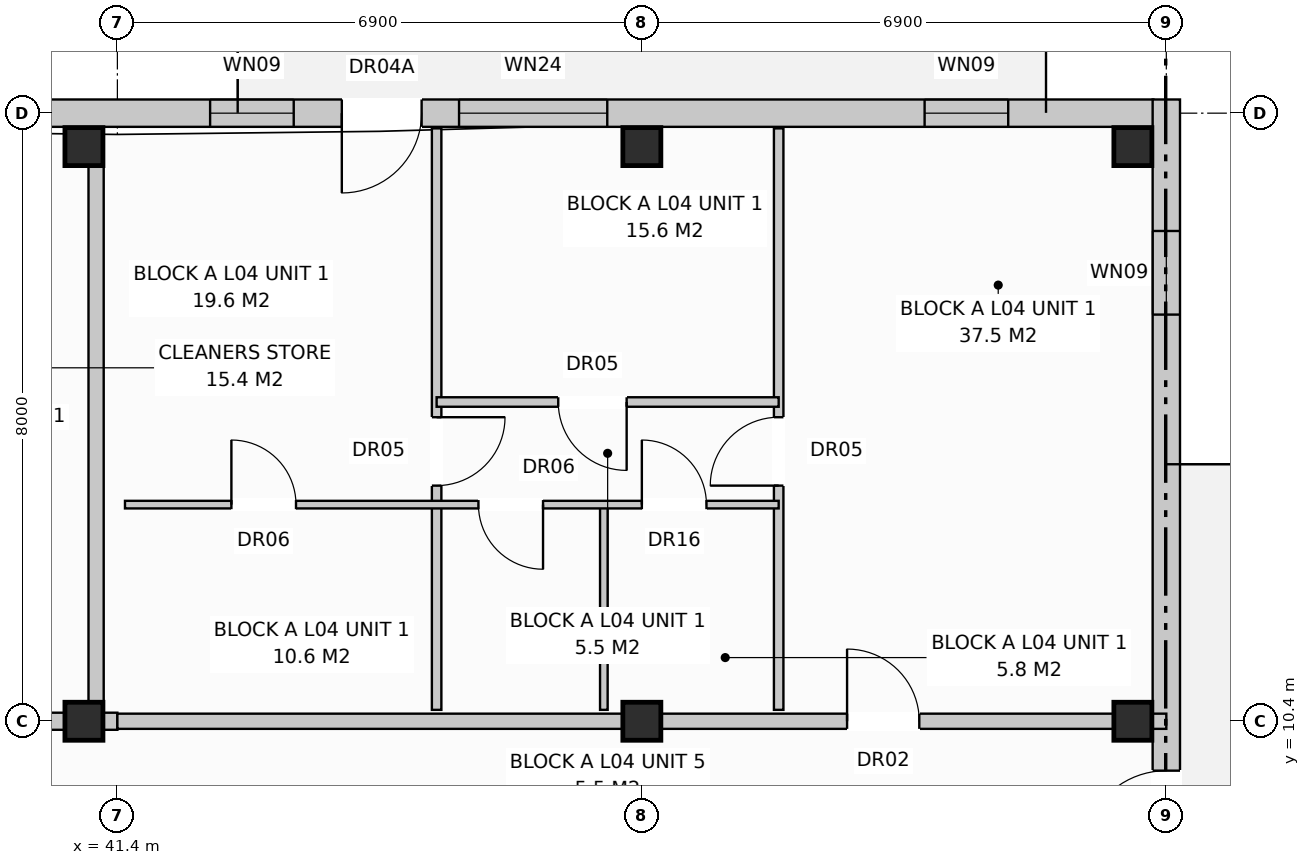
"""IFC4 building model, lengths in metres.
Left out: names, types, materials, properties, quantities, classifications, styles, units other than length and angle.
Written with IfcOpenShell. Run it as: python <this file> out.ifc"""

import sys

from ifc_helpers import new_model, si_unit, direction, frame, frame_2d, origin, origin_with_axes, origin_2d, place, context, subcontext, project, spatial, rectangle, extrude, element, fill, save


model = new_model("IFC4")
c1 = context("Model", 3, precision=1e-05, world=origin(), true_north=direction((0.0, 1.0)))
c2 = subcontext(c1, "Body", "Model", "MODEL_VIEW")
j1 = project(units=[si_unit("LENGTHUNIT", "METRE"), si_unit("PLANEANGLEUNIT", "RADIAN")], contexts=[c1])
p1 = place(None, origin())
s1 = spatial("IfcSite", under=j1, at=p1, CompositionType="ELEMENT")
p2 = place(p1, origin())
s2 = spatial("IfcBuilding", under=s1, at=p2, CompositionType="ELEMENT")
p3 = place(p2, frame((0.0, 0.0, 14.4)))
s3 = spatial("IfcBuildingStorey", under=s2, at=p3, CompositionType="ELEMENT", Elevation=14.4)
for number, where, z_axis, x_axis in (
    (1, (40.96, 10.4, 0.0), (0.0, 0.0, 1.0), (1.0, 0.0, 0.0)),
    (2, (40.96, 17.96, 0.0), (0.0, 0.0, 1.0), (1.0, 0.0, 0.0)),
    (3, (48.3, 10.4, 0.0), (0.0, 0.0, 1.0), (1.0, 0.0, 0.0)),
    (4, (48.3, 17.96, 0.0), (0.0, 0.0, 1.0), (1.0, 0.0, 0.0)),
    (5, (54.76, 10.4, 0.0), (0.0, 0.0, 1.0), (1.0, 0.0, 0.0)),
    (6, (54.76, 17.96, 0.0), (0.0, 0.0, 1.0), (1.0, 0.0, 0.0)),
):
    element("IfcColumn", number, at=place(p3, frame(where, z_axis=z_axis, x_axis=x_axis)), inside=s3, PredefinedType="COLUMN", context=c2, shape_type="SweptSolid", body=[
        extrude(rectangle(XDim=0.5, YDim=0.5, at=origin_2d()), origin(), (0.0, 0.0, 1.0), 3.2),
    ])
p4 = place(p3, frame((31.35, 18.4, 0.0), z_axis=(0.0, 0.0, 1.0), x_axis=(1.0, 0.0, 0.0)))
e7 = element("IfcWall", 7, at=p4, inside=s3, PredefinedType="STANDARD", context=c2, shape_type="SweptSolid", body=[
    extrude(rectangle(XDim=23.68, YDim=0.36, at=frame_2d((11.84, 0.0))), origin(), (0.0, 0.0, 1.0), 2.94),
])
p5 = place(p4, frame((13.003, 0.0, 0.0)))
e8 = element("IfcOpeningElement", 8, at=p5, cuts=e7, PredefinedType="OPENING", context=c2, shape_type="SweptSolid", body=[
    extrude(rectangle(XDim=1.05, YDim=2.12, at=frame_2d((0.525, 1.06))), frame((0.0, 0.192, 0.0), z_axis=(0.0, -1.0, 0.0), x_axis=(1.0, 0.0, 0.0)), (0.0, 0.0, 1.0), 0.384),
])
p6 = place(p4, frame((11.27, 0.0, 0.72)))
e9 = element("IfcOpeningElement", 9, at=p6, cuts=e7, PredefinedType="OPENING", context=c2, shape_type="SweptSolid", body=[
    extrude(rectangle(XDim=1.1, YDim=1.5, at=frame_2d((0.55, 0.75))), frame((0.0, 0.192, 0.0), z_axis=(0.0, -1.0, 0.0), x_axis=(1.0, 0.0, 0.0)), (0.0, 0.0, 1.0), 0.384),
])
p7 = place(p4, frame((14.545, 0.0, 0.8)))
e10 = element("IfcOpeningElement", 10, at=p7, cuts=e7, PredefinedType="OPENING", context=c2, shape_type="SweptSolid", body=[
    extrude(rectangle(XDim=1.95, YDim=1.65, at=frame_2d((0.975, 0.825))), frame((0.0, 0.192, 0.0), z_axis=(0.0, -1.0, 0.0), x_axis=(1.0, 0.0, 0.0)), (0.0, 0.0, 1.0), 0.384),
])
p8 = place(p4, frame((20.67, 0.0, 0.72)))
e11 = element("IfcOpeningElement", 11, at=p8, cuts=e7, PredefinedType="OPENING", context=c2, shape_type="SweptSolid", body=[
    extrude(rectangle(XDim=1.1, YDim=1.5, at=frame_2d((0.55, 0.75))), frame((0.0, 0.192, 0.0), z_axis=(0.0, -1.0, 0.0), x_axis=(1.0, 0.0, 0.0)), (0.0, 0.0, 1.0), 0.384),
])
p9 = place(p3, frame((55.2, -0.18, 0.0), z_axis=(0.0, 0.0, 1.0), x_axis=(0.0, 1.0, 0.0)))
e12 = element("IfcWall", 12, at=p9, inside=s3, PredefinedType="STANDARD", context=c2, shape_type="SweptSolid", body=[
    extrude(rectangle(XDim=18.76, YDim=0.36, at=frame_2d((9.38, 0.0))), origin(), (0.0, 0.0, 1.0), 2.94),
])
p10 = place(p9, frame((8.83, 0.0, 0.0)))
e13 = element("IfcOpeningElement", 13, at=p10, cuts=e12, PredefinedType="OPENING", context=c2, shape_type="SweptSolid", body=[
    extrude(rectangle(XDim=1.1, YDim=2.1, at=frame_2d((0.55, 1.05))), frame((0.0, 0.192, 0.0), z_axis=(0.0, -1.0, 0.0), x_axis=(1.0, 0.0, 0.0)), (0.0, 0.0, 1.0), 0.384),
])
p11 = place(p9, frame((1.73, 0.0, 0.72)))
e14 = element("IfcOpeningElement", 14, at=p11, cuts=e12, PredefinedType="OPENING", context=c2, shape_type="SweptSolid", body=[
    extrude(rectangle(XDim=1.1, YDim=1.5, at=frame_2d((0.55, 0.75))), frame((0.0, 0.192, 0.0), z_axis=(0.0, -1.0, 0.0), x_axis=(1.0, 0.0, 0.0)), (0.0, 0.0, 1.0), 0.384),
])
p12 = place(p9, frame((15.93, 0.0, 0.72)))
e15 = element("IfcOpeningElement", 15, at=p12, cuts=e12, PredefinedType="OPENING", context=c2, shape_type="SweptSolid", body=[
    extrude(rectangle(XDim=1.1, YDim=1.5, at=frame_2d((0.55, 0.75))), frame((0.0, 0.192, 0.0), z_axis=(0.0, -1.0, 0.0), x_axis=(1.0, 0.0, 0.0)), (0.0, 0.0, 1.0), 0.384),
])
p13 = place(p3, frame((41.12, 10.6, 0.0), z_axis=(0.0, 0.0, 1.0), x_axis=(0.0, 1.0, 0.0)))
e16 = element("IfcWall", 16, at=p13, inside=s3, PredefinedType="PARTITIONING", context=c2, shape_type="SweptSolid", body=[
    extrude(rectangle(XDim=7.6, YDim=0.2, at=frame_2d((3.8, 0.0))), origin(), (0.0, 0.0, 1.0), 2.94),
])
p14 = place(p3, frame((31.5, 10.4, 0.0), z_axis=(0.0, 0.0, 1.0), x_axis=(1.0, 0.0, 0.0)))
e17 = element("IfcWall", 17, at=p14, inside=s3, PredefinedType="PARTITIONING", context=c2, shape_type="SweptSolid", body=[
    extrude(rectangle(XDim=9.9, YDim=0.225, at=frame_2d((4.95, 0.0))), origin(), (0.0, 0.0, 1.0), 2.38),
])
p15 = place(p14, frame((0.475, 0.0, 0.0)))
e18 = element("IfcOpeningElement", 18, at=p15, cuts=e17, PredefinedType="OPENING", context=c2, shape_type="SweptSolid", body=[
    extrude(rectangle(XDim=1.1, YDim=2.15, at=frame_2d((0.55, 1.075))), frame((0.0, 0.125, 0.0), z_axis=(0.0, -1.0, 0.0), x_axis=(1.0, 0.0, 0.0)), (0.0, 0.0, 1.0), 0.249),
])
p16 = place(p14, frame((5.75, 0.0, 0.0)))
e19 = element("IfcOpeningElement", 19, at=p16, cuts=e17, PredefinedType="OPENING", context=c2, shape_type="SweptSolid", body=[
    extrude(rectangle(XDim=0.9, YDim=2.1, at=frame_2d((0.45, 1.05))), frame((0.0, 0.125, 0.0), z_axis=(0.0, -1.0, 0.0), x_axis=(1.0, 0.0, 0.0)), (0.0, 0.0, 1.0), 0.249),
])
p17 = place(p14, frame((7.8, 0.0, 0.0)))
e20 = element("IfcOpeningElement", 20, at=p17, cuts=e17, PredefinedType="OPENING", context=c2, shape_type="SweptSolid", body=[
    extrude(rectangle(XDim=0.95, YDim=2.15, at=frame_2d((0.475, 1.075))), frame((0.0, 0.125, 0.0), z_axis=(0.0, -1.0, 0.0), x_axis=(1.0, 0.0, 0.0)), (0.0, 0.0, 1.0), 0.249),
])
p18 = place(p3, frame((41.4, 10.4, 0.0), z_axis=(0.0, 0.0, 1.0), x_axis=(1.0, 0.0, 0.0)))
e21 = element("IfcWall", 21, at=p18, inside=s3, PredefinedType="PARTITIONING", context=c2, shape_type="SweptSolid", body=[
    extrude(rectangle(XDim=13.8, YDim=0.2, at=frame_2d((6.9, 0.0))), origin(), (0.0, 0.0, 1.0), 2.38),
])
p19 = place(p18, frame((9.6, 0.0, 0.0)))
e22 = element("IfcOpeningElement", 22, at=p19, cuts=e21, PredefinedType="OPENING", context=c2, shape_type="SweptSolid", body=[
    extrude(rectangle(XDim=0.95, YDim=2.15, at=frame_2d((0.475, 1.075))), frame((0.0, 0.112, 0.0), z_axis=(0.0, -1.0, 0.0), x_axis=(1.0, 0.0, 0.0)), (0.0, 0.0, 1.0), 0.224),
])
p20 = place(p3, frame((50.1, 10.55, 0.0), z_axis=(0.0, 0.0, 1.0), x_axis=(0.0, 1.0, 0.0)))
e23 = element("IfcWall", 23, at=p20, inside=s3, PredefinedType="PARTITIONING", context=c2, shape_type="SweptSolid", body=[
    extrude(rectangle(XDim=7.65, YDim=0.125, at=frame_2d((3.825, 0.0))), origin(), (0.0, 0.0, 1.0), 2.94),
])
p21 = place(p20, frame((2.95, 0.0, 0.0)))
e24 = element("IfcOpeningElement", 24, at=p21, cuts=e23, PredefinedType="OPENING", context=c2, shape_type="SweptSolid", body=[
    extrude(rectangle(XDim=0.9, YDim=2.1, at=frame_2d((0.45, 1.05))), frame((0.0, 0.074, 0.0), z_axis=(0.0, -1.0, 0.0), x_axis=(1.0, 0.0, 0.0)), (0.0, 0.0, 1.0), 0.149),
])
p22 = place(p3, frame((45.6, 10.55, 0.0), z_axis=(0.0, 0.0, 1.0), x_axis=(0.0, 1.0, 0.0)))
e25 = element("IfcWall", 25, at=p22, inside=s3, PredefinedType="PARTITIONING", context=c2, shape_type="SweptSolid", body=[
    extrude(rectangle(XDim=7.65, YDim=0.125, at=frame_2d((3.825, 0.0))), origin(), (0.0, 0.0, 1.0), 2.94),
])
p23 = place(p22, frame((2.95, 0.0, 0.0)))
e26 = element("IfcOpeningElement", 26, at=p23, cuts=e25, PredefinedType="OPENING", context=c2, shape_type="SweptSolid", body=[
    extrude(rectangle(XDim=0.9, YDim=2.1, at=frame_2d((0.45, 1.05))), frame((0.0, 0.074, 0.0), z_axis=(0.0, -1.0, 0.0), x_axis=(1.0, 0.0, 0.0)), (0.0, 0.0, 1.0), 0.149),
])
p24 = place(p3, frame((47.8, 10.55, 0.0), z_axis=(0.0, 0.0, 1.0), x_axis=(0.0, 1.0, 0.0)))
e27 = element("IfcWall", 27, at=p24, inside=s3, PredefinedType="PARTITIONING", context=c2, shape_type="SweptSolid", body=[
    extrude(rectangle(XDim=2.7, YDim=0.1, at=frame_2d((1.35, 0.0))), origin(), (0.0, 0.0, 1.0), 2.94),
])
p25 = place(p3, frame((41.5, 13.25, 0.0), z_axis=(0.0, 0.0, 1.0), x_axis=(1.0, 0.0, 0.0)))
e28 = element("IfcWall", 28, at=p25, inside=s3, PredefinedType="PARTITIONING", context=c2, shape_type="SweptSolid", body=[
    extrude(rectangle(XDim=8.6, YDim=0.1, at=frame_2d((4.3, 0.0))), origin(), (0.0, 0.0, 1.0), 2.94),
])
p26 = place(p25, frame((1.4, 0.0, 0.0)))
e29 = element("IfcOpeningElement", 29, at=p26, cuts=e28, PredefinedType="OPENING", context=c2, shape_type="SweptSolid", body=[
    extrude(rectangle(XDim=0.85, YDim=2.05, at=frame_2d((0.425, 1.025))), frame((0.0, 0.062, 0.0), z_axis=(0.0, -1.0, 0.0), x_axis=(1.0, 0.0, 0.0)), (0.0, 0.0, 1.0), 0.124),
])
p27 = place(p25, frame((4.65, 0.0, 0.0)))
e30 = element("IfcOpeningElement", 30, at=p27, cuts=e28, PredefinedType="OPENING", context=c2, shape_type="SweptSolid", body=[
    extrude(rectangle(XDim=0.85, YDim=2.05, at=frame_2d((0.425, 1.025))), frame((0.0, 0.062, 0.0), z_axis=(0.0, -1.0, 0.0), x_axis=(1.0, 0.0, 0.0)), (0.0, 0.0, 1.0), 0.124),
])
p28 = place(p25, frame((6.8, 0.0, 0.0)))
e31 = element("IfcOpeningElement", 31, at=p28, cuts=e28, PredefinedType="OPENING", context=c2, shape_type="SweptSolid", body=[
    extrude(rectangle(XDim=0.85, YDim=2.1, at=frame_2d((0.425, 1.05))), frame((0.0, 0.062, 0.0), z_axis=(0.0, -1.0, 0.0), x_axis=(1.0, 0.0, 0.0)), (0.0, 0.0, 1.0), 0.124),
])
p29 = place(p3, frame((45.6, 14.6, 0.0), z_axis=(0.0, 0.0, 1.0), x_axis=(1.0, 0.0, 0.0)))
e32 = element("IfcWall", 32, at=p29, inside=s3, PredefinedType="PARTITIONING", context=c2, shape_type="SweptSolid", body=[
    extrude(rectangle(XDim=4.5, YDim=0.125, at=frame_2d((2.25, 0.0))), origin(), (0.0, 0.0, 1.0), 2.94),
])
p30 = place(p29, frame((1.6, 0.0, 0.0)))
e33 = element("IfcOpeningElement", 33, at=p30, cuts=e32, PredefinedType="OPENING", context=c2, shape_type="SweptSolid", body=[
    extrude(rectangle(XDim=0.9, YDim=2.1, at=frame_2d((0.45, 1.05))), frame((0.0, 0.074, 0.0), z_axis=(0.0, -1.0, 0.0), x_axis=(1.0, 0.0, 0.0)), (0.0, 0.0, 1.0), 0.149),
])
p31 = place(p5, frame((1.05, 0.0, 0.0), z_axis=(0.0, 0.0, 1.0), x_axis=(-1.0, 0.0, 0.0)))
e34 = element("IfcDoor", 34, at=p31, inside=s3, OperationType="SINGLE_SWING_LEFT", PredefinedType="DOOR", context=c2, shape_type="SweptSolid", body=[
    extrude(rectangle(XDim=1.05, YDim=2.12, at=frame_2d((0.525, 1.06))), frame((0.0, 0.025, 0.0), z_axis=(0.0, -1.0, 0.0), x_axis=(1.0, 0.0, 0.0)), (0.0, 0.0, 1.0), 0.05),
])
fill(e8, e34)
p32 = place(p6, origin_with_axes())
e35 = element("IfcWindow", 35, at=p32, inside=s3, PartitioningType="SINGLE_PANEL", PredefinedType="WINDOW", context=c2, shape_type="SweptSolid", body=[
    extrude(rectangle(XDim=1.1, YDim=1.5, at=frame_2d((0.55, 0.75))), frame((0.0, 0.03, 0.0), z_axis=(0.0, -1.0, 0.0), x_axis=(1.0, 0.0, 0.0)), (0.0, 0.0, 1.0), 0.06),
])
fill(e9, e35)
p33 = place(p7, origin_with_axes())
e36 = element("IfcWindow", 36, at=p33, inside=s3, PartitioningType="SINGLE_PANEL", PredefinedType="WINDOW", context=c2, shape_type="SweptSolid", body=[
    extrude(rectangle(XDim=1.95, YDim=1.65, at=frame_2d((0.975, 0.825))), frame((0.0, 0.03, 0.0), z_axis=(0.0, -1.0, 0.0), x_axis=(1.0, 0.0, 0.0)), (0.0, 0.0, 1.0), 0.06),
])
fill(e10, e36)
p34 = place(p8, origin_with_axes())
e37 = element("IfcWindow", 37, at=p34, inside=s3, PartitioningType="SINGLE_PANEL", PredefinedType="WINDOW", context=c2, shape_type="SweptSolid", body=[
    extrude(rectangle(XDim=1.1, YDim=1.5, at=frame_2d((0.55, 0.75))), frame((0.0, 0.03, 0.0), z_axis=(0.0, -1.0, 0.0), x_axis=(1.0, 0.0, 0.0)), (0.0, 0.0, 1.0), 0.06),
])
fill(e11, e37)
p35 = place(p10, origin_with_axes())
e38 = element("IfcDoor", 38, at=p35, inside=s3, OperationType="SINGLE_SWING_LEFT", PredefinedType="DOOR", context=c2, shape_type="SweptSolid", body=[
    extrude(rectangle(XDim=1.1, YDim=2.1, at=frame_2d((0.55, 1.05))), frame((0.0, 0.025, 0.0), z_axis=(0.0, -1.0, 0.0), x_axis=(1.0, 0.0, 0.0)), (0.0, 0.0, 1.0), 0.05),
])
fill(e13, e38)
p36 = place(p12, origin_with_axes())
e39 = element("IfcWindow", 39, at=p36, inside=s3, PartitioningType="SINGLE_PANEL", PredefinedType="WINDOW", context=c2, shape_type="SweptSolid", body=[
    extrude(rectangle(XDim=1.1, YDim=1.5, at=frame_2d((0.55, 0.75))), frame((0.0, 0.03, 0.0), z_axis=(0.0, -1.0, 0.0), x_axis=(1.0, 0.0, 0.0)), (0.0, 0.0, 1.0), 0.06),
])
fill(e15, e39)
p37 = place(p19, origin_with_axes())
e40 = element("IfcDoor", 40, at=p37, inside=s3, OperationType="SINGLE_SWING_LEFT", PredefinedType="DOOR", context=c2, shape_type="SweptSolid", body=[
    extrude(rectangle(XDim=0.95, YDim=2.15, at=frame_2d((0.475, 1.075))), frame((0.0, 0.025, 0.0), z_axis=(0.0, -1.0, 0.0), x_axis=(1.0, 0.0, 0.0)), (0.0, 0.0, 1.0), 0.05),
])
fill(e22, e40)
p38 = place(p21, origin_with_axes())
e41 = element("IfcDoor", 41, at=p38, inside=s3, OperationType="SINGLE_SWING_LEFT", PredefinedType="DOOR", context=c2, shape_type="SweptSolid", body=[
    extrude(rectangle(XDim=0.9, YDim=2.1, at=frame_2d((0.45, 1.05))), frame((0.0, 0.025, 0.0), z_axis=(0.0, -1.0, 0.0), x_axis=(1.0, 0.0, 0.0)), (0.0, 0.0, 1.0), 0.05),
])
fill(e24, e41)
p39 = place(p23, frame((0.9, 0.0, 0.0), z_axis=(0.0, 0.0, 1.0), x_axis=(-1.0, 0.0, 0.0)))
e42 = element("IfcDoor", 42, at=p39, inside=s3, OperationType="SINGLE_SWING_RIGHT", PredefinedType="DOOR", context=c2, shape_type="SweptSolid", body=[
    extrude(rectangle(XDim=0.9, YDim=2.1, at=frame_2d((0.45, 1.05))), frame((0.0, 0.025, 0.0), z_axis=(0.0, -1.0, 0.0), x_axis=(1.0, 0.0, 0.0)), (0.0, 0.0, 1.0), 0.05),
])
fill(e26, e42)
p40 = place(p26, origin_with_axes())
e43 = element("IfcDoor", 43, at=p40, inside=s3, OperationType="SINGLE_SWING_LEFT", PredefinedType="DOOR", context=c2, shape_type="SweptSolid", body=[
    extrude(rectangle(XDim=0.85, YDim=2.05, at=frame_2d((0.425, 1.025))), frame((0.0, 0.025, 0.0), z_axis=(0.0, -1.0, 0.0), x_axis=(1.0, 0.0, 0.0)), (0.0, 0.0, 1.0), 0.05),
])
fill(e29, e43)
p41 = place(p27, frame((0.85, 0.0, 0.0), z_axis=(0.0, 0.0, 1.0), x_axis=(-1.0, 0.0, 0.0)))
e44 = element("IfcDoor", 44, at=p41, inside=s3, OperationType="SINGLE_SWING_RIGHT", PredefinedType="DOOR", context=c2, shape_type="SweptSolid", body=[
    extrude(rectangle(XDim=0.85, YDim=2.05, at=frame_2d((0.425, 1.025))), frame((0.0, 0.025, 0.0), z_axis=(0.0, -1.0, 0.0), x_axis=(1.0, 0.0, 0.0)), (0.0, 0.0, 1.0), 0.05),
])
fill(e30, e44)
p42 = place(p28, origin_with_axes())
e45 = element("IfcDoor", 45, at=p42, inside=s3, OperationType="SINGLE_SWING_LEFT", PredefinedType="DOOR", context=c2, shape_type="SweptSolid", body=[
    extrude(rectangle(XDim=0.85, YDim=2.1, at=frame_2d((0.425, 1.05))), frame((0.0, 0.025, 0.0), z_axis=(0.0, -1.0, 0.0), x_axis=(1.0, 0.0, 0.0)), (0.0, 0.0, 1.0), 0.05),
])
fill(e31, e45)
p43 = place(p30, frame((0.9, 0.0, 0.0), z_axis=(0.0, 0.0, 1.0), x_axis=(-1.0, 0.0, 0.0)))
e46 = element("IfcDoor", 46, at=p43, inside=s3, OperationType="SINGLE_SWING_RIGHT", PredefinedType="DOOR", context=c2, shape_type="SweptSolid", body=[
    extrude(rectangle(XDim=0.9, YDim=2.1, at=frame_2d((0.45, 1.05))), frame((0.0, 0.025, 0.0), z_axis=(0.0, -1.0, 0.0), x_axis=(1.0, 0.0, 0.0)), (0.0, 0.0, 1.0), 0.05),
])
fill(e33, e46)
save(model, sys.argv[1])
